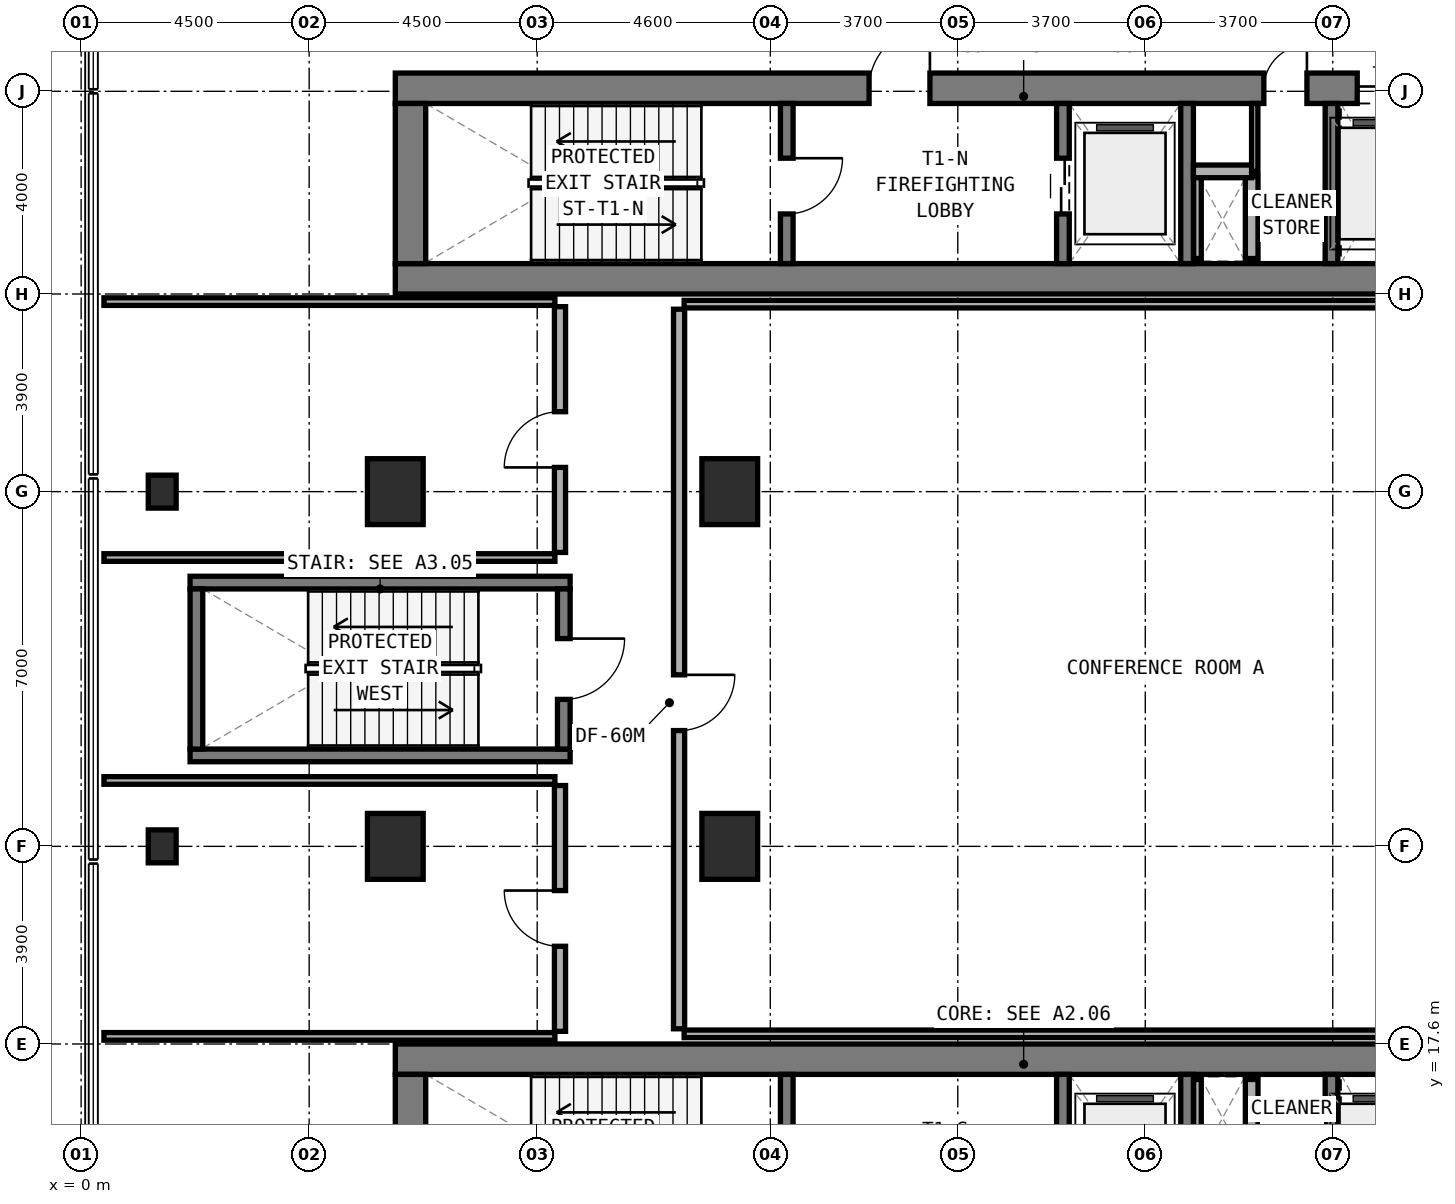
"""IFC4 building model, lengths in metres.
Left out: names, types, materials, properties, quantities, classifications, styles, units other than length and angle.
Written with IfcOpenShell. Run it as: python <this file> out.ifc"""

import sys

from ifc_helpers import new_model, si_unit, direction, frame, frame_2d, origin, origin_2d, place, context, subcontext, project, spatial, rectangle, extrude, element, fill, save


model = new_model("IFC4")
c1 = context("Model", 3, precision=1e-05, world=origin(), true_north=direction((0.0, 1.0)))
c2 = subcontext(c1, "Body", "Model", "MODEL_VIEW")
j1 = project(units=[si_unit("LENGTHUNIT", "METRE"), si_unit("PLANEANGLEUNIT", "RADIAN")], contexts=[c1])
p1 = place(None, origin())
s1 = spatial("IfcSite", under=j1, at=p1, CompositionType="ELEMENT")
p2 = place(p1, origin())
s2 = spatial("IfcBuilding", under=s1, at=p2, CompositionType="ELEMENT")
p3 = place(p2, frame((0.0, 0.0, 15.0)))
s3 = spatial("IfcBuildingStorey", under=s2, at=p3, CompositionType="ELEMENT", Elevation=15.0)
p4 = place(p3, frame((6.2, 32.7, 0.0), z_axis=(0.0, 0.0, 1.0), x_axis=(1.0, 0.0, 0.0)))
e1 = element("IfcWall", 1, at=p4, inside=s3, PredefinedType="SHEAR", context=c2, shape_type="SweptSolid", body=[
    extrude(rectangle(XDim=24.8, YDim=0.6, at=frame_2d((12.4, 0.0))), origin(), (0.0, 0.0, 1.0), 4.5),
])
p5 = place(p3, frame((6.2, 36.46, 0.0), z_axis=(0.0, 0.0, 1.0), x_axis=(1.0, 0.0, 0.0)))
e2 = element("IfcWall", 2, at=p5, inside=s3, PredefinedType="SHEAR", context=c2, shape_type="SweptSolid", body=[
    extrude(rectangle(XDim=24.8, YDim=0.6, at=frame_2d((12.4, 0.0))), origin(), (0.0, 0.0, 1.0), 4.5),
])
p6 = place(p5, frame((9.35, 0.0, 0.0)))
e3 = element("IfcOpeningElement", 3, at=p6, cuts=e2, PredefinedType="OPENING", context=c2, shape_type="SweptSolid", body=[
    extrude(rectangle(XDim=1.2, YDim=2.15, at=frame_2d((0.6, 1.075))), frame((0.0, 0.31, 0.0), z_axis=(0.0, -1.0, 0.0), x_axis=(1.0, 0.0, 0.0)), (0.0, 0.0, 1.0), 0.62),
])
p7 = place(p5, frame((17.14, 0.0, 0.0)))
e4 = element("IfcOpeningElement", 4, at=p7, cuts=e2, PredefinedType="OPENING", context=c2, shape_type="SweptSolid", body=[
    extrude(rectangle(XDim=0.85, YDim=2.1, at=frame_2d((0.425, 1.05))), frame((0.0, 0.31, 0.0), z_axis=(0.0, -1.0, 0.0), x_axis=(1.0, 0.0, 0.0)), (0.0, 0.0, 1.0), 0.62),
])
p8 = place(p5, frame((18.983, 0.0, 0.0)))
e5 = element("IfcOpeningElement", 5, at=p8, cuts=e2, PredefinedType="OPENING", context=c2, shape_type="SweptSolid", body=[
    extrude(rectangle(XDim=1.1, YDim=2.15, at=frame_2d((0.55, 1.075))), frame((0.0, 0.31, 0.0), z_axis=(0.0, -1.0, 0.0), x_axis=(1.0, 0.0, 0.0)), (0.0, 0.0, 1.0), 0.62),
])
p9 = place(p5, frame((20.85, 0.0, 0.0)))
e6 = element("IfcOpeningElement", 6, at=p9, cuts=e2, PredefinedType="OPENING", context=c2, shape_type="SweptSolid", body=[
    extrude(rectangle(XDim=1.1, YDim=2.15, at=frame_2d((0.55, 1.075))), frame((0.0, 0.31, 0.0), z_axis=(0.0, -1.0, 0.0), x_axis=(1.0, 0.0, 0.0)), (0.0, 0.0, 1.0), 0.62),
])
p10 = place(p5, frame((22.716, 0.0, 0.0)))
e7 = element("IfcOpeningElement", 7, at=p10, cuts=e2, PredefinedType="OPENING", context=c2, shape_type="SweptSolid", body=[
    extrude(rectangle(XDim=1.1, YDim=2.15, at=frame_2d((0.55, 1.075))), frame((0.0, 0.31, 0.0), z_axis=(0.0, -1.0, 0.0), x_axis=(1.0, 0.0, 0.0)), (0.0, 0.0, 1.0), 0.62),
])
p11 = place(p3, frame((6.5, 33.0, 0.0), z_axis=(0.0, 0.0, 1.0), x_axis=(0.0, 1.0, 0.0)))
e8 = element("IfcWall", 8, at=p11, inside=s3, PredefinedType="SHEAR", context=c2, shape_type="SweptSolid", body=[
    extrude(rectangle(XDim=3.16, YDim=0.6, at=frame_2d((1.58, 0.0))), origin(), (0.0, 0.0, 1.0), 4.5),
])
p12 = place(p3, frame((13.925, 33.0, 0.0), z_axis=(0.0, 0.0, 1.0), x_axis=(0.0, 1.0, 0.0)))
e9 = element("IfcWall", 9, at=p12, inside=s3, PredefinedType="STANDARD", context=c2, shape_type="SweptSolid", body=[
    extrude(rectangle(XDim=3.16, YDim=0.25, at=frame_2d((1.58, 0.0))), origin(), (0.0, 0.0, 1.0), 4.1),
])
p13 = place(p12, frame((0.98, 0.0, 0.0)))
e10 = element("IfcOpeningElement", 10, at=p13, cuts=e9, PredefinedType="OPENING", context=c2, shape_type="SweptSolid", body=[
    extrude(rectangle(XDim=1.1, YDim=2.15, at=frame_2d((0.55, 1.075))), frame((0.0, 0.135, 0.0), z_axis=(0.0, -1.0, 0.0), x_axis=(1.0, 0.0, 0.0)), (0.0, 0.0, 1.0), 0.27),
])
p14 = place(p3, frame((19.375, 33.0, 0.0), z_axis=(0.0, 0.0, 1.0), x_axis=(0.0, 1.0, 0.0)))
e11 = element("IfcWall", 11, at=p14, inside=s3, PredefinedType="STANDARD", context=c2, shape_type="SweptSolid", body=[
    extrude(rectangle(XDim=3.16, YDim=0.25, at=frame_2d((1.58, 0.0))), origin(), (0.0, 0.0, 1.0), 4.1),
])
p15 = place(p14, frame((0.98, 0.0, 0.0)))
e12 = element("IfcOpeningElement", 12, at=p15, cuts=e11, PredefinedType="OPENING", context=c2, shape_type="SweptSolid", body=[
    extrude(rectangle(XDim=1.1, YDim=2.15, at=frame_2d((0.55, 1.075))), frame((0.0, 0.135, 0.0), z_axis=(0.0, -1.0, 0.0), x_axis=(1.0, 0.0, 0.0)), (0.0, 0.0, 1.0), 0.27),
])
for number, where, z_axis, x_axis in (
    (13, (21.825, 33.0, 0.0), (0.0, 0.0, 1.0), (0.0, 1.0, 0.0)),
    (14, (24.675, 33.0, 0.0), (0.0, 0.0, 1.0), (0.0, 1.0, 0.0)),
):
    element("IfcWall", number, at=place(p3, frame(where, z_axis=z_axis, x_axis=x_axis)), inside=s3, PredefinedType="STANDARD", context=c2, shape_type="SweptSolid", body=[
        extrude(rectangle(XDim=3.16, YDim=0.25, at=frame_2d((1.58, 0.0))), origin(), (0.0, 0.0, 1.0), 4.1),
    ])
p16 = place(p3, frame((6.2, 17.3, 0.0), z_axis=(0.0, 0.0, 1.0), x_axis=(1.0, 0.0, 0.0)))
e15 = element("IfcWall", 15, at=p16, inside=s3, PredefinedType="SHEAR", context=c2, shape_type="SweptSolid", body=[
    extrude(rectangle(XDim=24.8, YDim=0.6, at=frame_2d((12.4, 0.0))), origin(), (0.0, 0.0, 1.0), 4.5),
])
p17 = place(p3, frame((6.5, 13.84, 0.0), z_axis=(0.0, 0.0, 1.0), x_axis=(0.0, 1.0, 0.0)))
e16 = element("IfcWall", 16, at=p17, inside=s3, PredefinedType="SHEAR", context=c2, shape_type="SweptSolid", body=[
    extrude(rectangle(XDim=3.16, YDim=0.6, at=frame_2d((1.58, 0.0))), origin(), (0.0, 0.0, 1.0), 4.5),
])
p18 = place(p3, frame((13.925, 13.84, 0.0), z_axis=(0.0, 0.0, 1.0), x_axis=(0.0, 1.0, 0.0)))
e17 = element("IfcWall", 17, at=p18, inside=s3, PredefinedType="STANDARD", context=c2, shape_type="SweptSolid", body=[
    extrude(rectangle(XDim=3.16, YDim=0.25, at=frame_2d((1.58, 0.0))), origin(), (0.0, 0.0, 1.0), 4.1),
])
p19 = place(p18, frame((0.98, 0.0, 0.0)))
e18 = element("IfcOpeningElement", 18, at=p19, cuts=e17, PredefinedType="OPENING", context=c2, shape_type="SweptSolid", body=[
    extrude(rectangle(XDim=1.1, YDim=2.15, at=frame_2d((0.55, 1.075))), frame((0.0, 0.135, 0.0), z_axis=(0.0, -1.0, 0.0), x_axis=(1.0, 0.0, 0.0)), (0.0, 0.0, 1.0), 0.27),
])
p20 = place(p3, frame((19.375, 13.84, 0.0), z_axis=(0.0, 0.0, 1.0), x_axis=(0.0, 1.0, 0.0)))
e19 = element("IfcWall", 19, at=p20, inside=s3, PredefinedType="STANDARD", context=c2, shape_type="SweptSolid", body=[
    extrude(rectangle(XDim=3.16, YDim=0.25, at=frame_2d((1.58, 0.0))), origin(), (0.0, 0.0, 1.0), 4.1),
])
p21 = place(p20, frame((0.98, 0.0, 0.0)))
e20 = element("IfcOpeningElement", 20, at=p21, cuts=e19, PredefinedType="OPENING", context=c2, shape_type="SweptSolid", body=[
    extrude(rectangle(XDim=1.1, YDim=2.15, at=frame_2d((0.55, 1.075))), frame((0.0, 0.135, 0.0), z_axis=(0.0, -1.0, 0.0), x_axis=(1.0, 0.0, 0.0)), (0.0, 0.0, 1.0), 0.27),
])
for number, where, z_axis, x_axis in (
    (21, (21.825, 13.84, 0.0), (0.0, 0.0, 1.0), (0.0, 1.0, 0.0)),
    (22, (24.675, 13.84, 0.0), (0.0, 0.0, 1.0), (0.0, 1.0, 0.0)),
):
    element("IfcWall", number, at=place(p3, frame(where, z_axis=z_axis, x_axis=x_axis)), inside=s3, PredefinedType="STANDARD", context=c2, shape_type="SweptSolid", body=[
        extrude(rectangle(XDim=3.16, YDim=0.25, at=frame_2d((1.58, 0.0))), origin(), (0.0, 0.0, 1.0), 4.1),
    ])
for number, where, z_axis, x_axis in (
    (23, (2.15, 23.295, 0.0), (0.0, 0.0, 1.0), (1.0, 0.0, 0.0)),
    (24, (2.15, 26.705, 0.0), (0.0, 0.0, 1.0), (1.0, 0.0, 0.0)),
):
    element("IfcWall", number, at=place(p3, frame(where, z_axis=z_axis, x_axis=x_axis)), inside=s3, PredefinedType="STANDARD", context=c2, shape_type="SweptSolid", body=[
        extrude(rectangle(XDim=7.5, YDim=0.25, at=frame_2d((3.75, 0.0))), origin(), (0.0, 0.0, 1.0), 4.5),
    ])
p22 = place(p3, frame((2.275, 23.42, 0.0), z_axis=(0.0, 0.0, 1.0), x_axis=(0.0, 1.0, 0.0)))
e25 = element("IfcWall", 25, at=p22, inside=s3, PredefinedType="STANDARD", context=c2, shape_type="SweptSolid", body=[
    extrude(rectangle(XDim=3.16, YDim=0.25, at=frame_2d((1.58, 0.0))), origin(), (0.0, 0.0, 1.0), 4.5),
])
p23 = place(p3, frame((9.525, 23.42, 0.0), z_axis=(0.0, 0.0, 1.0), x_axis=(0.0, 1.0, 0.0)))
e26 = element("IfcWall", 26, at=p23, inside=s3, PredefinedType="STANDARD", context=c2, shape_type="SweptSolid", body=[
    extrude(rectangle(XDim=3.16, YDim=0.25, at=frame_2d((1.58, 0.0))), origin(), (0.0, 0.0, 1.0), 4.5),
])
p24 = place(p23, frame((0.98, 0.0, 0.0)))
e27 = element("IfcOpeningElement", 27, at=p24, cuts=e26, PredefinedType="OPENING", context=c2, shape_type="SweptSolid", body=[
    extrude(rectangle(XDim=1.2, YDim=2.15, at=frame_2d((0.6, 1.075))), frame((0.0, 0.135, 0.0), z_axis=(0.0, -1.0, 0.0), x_axis=(1.0, 0.0, 0.0)), (0.0, 0.0, 1.0), 0.27),
])
for number, where, z_axis, x_axis in (
    (28, (6.2, 21.5, 0.0), (0.0, 0.0, 1.0), (1.0, 0.0, 0.0)),
    (29, (6.2, 28.5, 0.0), (0.0, 0.0, 1.0), (1.0, 0.0, 0.0)),
    (30, (12.8, 21.5, 0.0), (0.0, 0.0, 1.0), (1.0, 0.0, 0.0)),
    (31, (12.8, 28.5, 0.0), (0.0, 0.0, 1.0), (1.0, 0.0, 0.0)),
):
    element("IfcColumn", number, at=place(p3, frame(where, z_axis=z_axis, x_axis=x_axis)), inside=s3, PredefinedType="COLUMN", context=c2, shape_type="SweptSolid", body=[
        extrude(rectangle(XDim=1.1, YDim=1.3, at=origin_2d()), origin(), (0.0, 0.0, 1.0), 4.5),
    ])
for number, where, z_axis, x_axis in (
    (32, (1.6, 21.5, 0.0), (0.0, 0.0, 1.0), (1.0, 0.0, 0.0)),
    (33, (1.6, 28.5, 0.0), (0.0, 0.0, 1.0), (1.0, 0.0, 0.0)),
):
    element("IfcColumn", number, at=place(p3, frame(where, z_axis=z_axis, x_axis=x_axis)), inside=s3, PredefinedType="PILASTER", context=c2, shape_type="SweptSolid", body=[
        extrude(rectangle(XDim=0.55, YDim=0.65, at=origin_2d()), origin(), (0.0, 0.0, 1.0), 4.5),
    ])
p25 = place(p3, frame((22.03, 33.1, 0.0), z_axis=(0.0, 0.0, 1.0), x_axis=(0.0, 1.0, 0.0)))
e34 = element("IfcWall", 34, at=p25, inside=s3, PredefinedType="PARTITIONING", context=c2, shape_type="SweptSolid", body=[
    extrude(rectangle(XDim=1.62, YDim=0.15, at=frame_2d((0.81, 0.0))), origin(), (0.0, 0.0, 1.0), 4.1),
])
p26 = place(p3, frame((23.1, 33.1, 0.0), z_axis=(0.0, 0.0, 1.0), x_axis=(0.0, 1.0, 0.0)))
e35 = element("IfcWall", 35, at=p26, inside=s3, PredefinedType="SOLIDWALL", context=c2, shape_type="SweptSolid", body=[
    extrude(rectangle(XDim=1.62, YDim=0.25, at=frame_2d((0.81, 0.0))), origin(), (0.0, 0.0, 1.0), 4.1),
])
p27 = place(p3, frame((21.95, 34.82, 0.0), z_axis=(0.0, 0.0, 1.0), x_axis=(1.0, 0.0, 0.0)))
e36 = element("IfcWall", 36, at=p27, inside=s3, PredefinedType="SOLIDWALL", context=c2, shape_type="SweptSolid", body=[
    extrude(rectangle(XDim=1.15, YDim=0.25, at=frame_2d((0.575, 0.0))), origin(), (0.0, 0.0, 1.0), 4.1),
])
p28 = place(p3, frame((23.16, 34.82, 0.0), z_axis=(0.0, 0.0, 1.0), x_axis=(0.0, 1.0, 0.0)))
e37 = element("IfcWall", 37, at=p28, inside=s3, PredefinedType="PARTITIONING", context=c2, shape_type="SweptSolid", body=[
    extrude(rectangle(XDim=1.34, YDim=0.125, at=frame_2d((0.67, 0.0))), origin(), (0.0, 0.0, 1.0), 4.1),
])
p29 = place(p3, frame((22.03, 15.28, 0.0), z_axis=(0.0, 0.0, 1.0), x_axis=(0.0, 1.0, 0.0)))
e38 = element("IfcWall", 38, at=p29, inside=s3, PredefinedType="PARTITIONING", context=c2, shape_type="SweptSolid", body=[
    extrude(rectangle(XDim=1.62, YDim=0.15, at=frame_2d((0.81, 0.0))), origin(), (0.0, 0.0, 1.0), 4.1),
])
p30 = place(p3, frame((23.1, 15.28, 0.0), z_axis=(0.0, 0.0, 1.0), x_axis=(0.0, 1.0, 0.0)))
e39 = element("IfcWall", 39, at=p30, inside=s3, PredefinedType="SOLIDWALL", context=c2, shape_type="SweptSolid", body=[
    extrude(rectangle(XDim=1.62, YDim=0.25, at=frame_2d((0.81, 0.0))), origin(), (0.0, 0.0, 1.0), 4.1),
])
for number, where, z_axis, x_axis in (
    (40, (11.9, 17.8, 0.0), (0.0, 0.0, 1.0), (1.0, 0.0, 0.0)),
    (41, (11.9, 32.2, 0.0), (0.0, 0.0, 1.0), (1.0, 0.0, 0.0)),
):
    element("IfcWall", number, at=place(p3, frame(where, z_axis=z_axis, x_axis=x_axis)), inside=s3, PredefinedType="PARTITIONING", context=c2, shape_type="SweptSolid", body=[
        extrude(rectangle(XDim=19.0, YDim=0.15, at=frame_2d((9.5, 0.0))), origin(), (0.0, 0.0, 1.0), 3.175),
    ])
p31 = place(p3, frame((11.8, 17.9, 0.0), z_axis=(0.0, 0.0, 1.0), x_axis=(0.0, 1.0, 0.0)))
e42 = element("IfcWall", 42, at=p31, inside=s3, PredefinedType="SOLIDWALL", context=c2, shape_type="SweptSolid", body=[
    extrude(rectangle(XDim=14.2, YDim=0.22, at=frame_2d((7.1, 0.0))), origin(), (0.0, 0.0, 1.0), 3.175),
])
p32 = place(p31, frame((5.885, 0.0, 0.0)))
e43 = element("IfcOpeningElement", 43, at=p32, cuts=e42, PredefinedType="OPENING", context=c2, shape_type="SweptSolid", body=[
    extrude(rectangle(XDim=1.1, YDim=2.1, at=frame_2d((0.55, 1.05))), frame((0.0, 0.12, 0.0), z_axis=(0.0, -1.0, 0.0), x_axis=(1.0, 0.0, 0.0)), (0.0, 0.0, 1.0), 0.24),
])
p33 = place(p3, frame((0.45, 17.75, 0.0), z_axis=(0.0, 0.0, 1.0), x_axis=(1.0, 0.0, 0.0)))
e44 = element("IfcWall", 44, at=p33, inside=s3, PredefinedType="PARTITIONING", context=c2, shape_type="SweptSolid", body=[
    extrude(rectangle(XDim=8.9, YDim=0.15, at=frame_2d((4.45, 0.0))), origin(), (0.0, 0.0, 1.0), 3.375),
])
p34 = place(p3, frame((0.45, 22.8, 0.0), z_axis=(0.0, 0.0, 1.0), x_axis=(1.0, 0.0, 0.0)))
e45 = element("IfcWall", 45, at=p34, inside=s3, PredefinedType="PARTITIONING", context=c2, shape_type="SweptSolid", body=[
    extrude(rectangle(XDim=8.9, YDim=0.15, at=frame_2d((4.45, 0.0))), origin(), (0.0, 0.0, 1.0), 3.575),
])
p35 = place(p3, frame((9.45, 17.85, 0.0), z_axis=(0.0, 0.0, 1.0), x_axis=(0.0, 1.0, 0.0)))
e46 = element("IfcWall", 46, at=p35, inside=s3, PredefinedType="SOLIDWALL", context=c2, shape_type="SweptSolid", body=[
    extrude(rectangle(XDim=4.85, YDim=0.22, at=frame_2d((2.425, 0.0))), origin(), (0.0, 0.0, 1.0), 3.175),
])
p36 = place(p35, frame((1.678, 0.0, 0.0)))
e47 = element("IfcOpeningElement", 47, at=p36, cuts=e46, PredefinedType="OPENING", context=c2, shape_type="SweptSolid", body=[
    extrude(rectangle(XDim=1.1, YDim=2.1, at=frame_2d((0.55, 1.05))), frame((0.0, 0.12, 0.0), z_axis=(0.0, -1.0, 0.0), x_axis=(1.0, 0.0, 0.0)), (0.0, 0.0, 1.0), 0.24),
])
p37 = place(p3, frame((0.45, 27.2, 0.0), z_axis=(0.0, 0.0, 1.0), x_axis=(1.0, 0.0, 0.0)))
e48 = element("IfcWall", 48, at=p37, inside=s3, PredefinedType="PARTITIONING", context=c2, shape_type="SweptSolid", body=[
    extrude(rectangle(XDim=8.9, YDim=0.15, at=frame_2d((4.45, 0.0))), origin(), (0.0, 0.0, 1.0), 3.575),
])
p38 = place(p3, frame((0.45, 32.25, 0.0), z_axis=(0.0, 0.0, 1.0), x_axis=(1.0, 0.0, 0.0)))
e49 = element("IfcWall", 49, at=p38, inside=s3, PredefinedType="PARTITIONING", context=c2, shape_type="SweptSolid", body=[
    extrude(rectangle(XDim=8.9, YDim=0.15, at=frame_2d((4.45, 0.0))), origin(), (0.0, 0.0, 1.0), 3.375),
])
p39 = place(p3, frame((9.45, 27.3, 0.0), z_axis=(0.0, 0.0, 1.0), x_axis=(0.0, 1.0, 0.0)))
e50 = element("IfcWall", 50, at=p39, inside=s3, PredefinedType="SOLIDWALL", context=c2, shape_type="SweptSolid", body=[
    extrude(rectangle(XDim=4.85, YDim=0.22, at=frame_2d((2.425, 0.0))), origin(), (0.0, 0.0, 1.0), 3.175),
])
p40 = place(p39, frame((1.678, 0.0, 0.0)))
e51 = element("IfcOpeningElement", 51, at=p40, cuts=e50, PredefinedType="OPENING", context=c2, shape_type="SweptSolid", body=[
    extrude(rectangle(XDim=1.1, YDim=2.1, at=frame_2d((0.55, 1.05))), frame((0.0, 0.12, 0.0), z_axis=(0.0, -1.0, 0.0), x_axis=(1.0, 0.0, 0.0)), (0.0, 0.0, 1.0), 0.24),
])
p41 = place(p13, frame((1.1, 0.0, 0.0), z_axis=(0.0, 0.0, 1.0), x_axis=(-1.0, 0.0, 0.0)))
e52 = element("IfcDoor", 52, at=p41, inside=s3, OperationType="SINGLE_SWING_LEFT", PredefinedType="DOOR", context=c2, shape_type="SweptSolid", body=[
    extrude(rectangle(XDim=1.1, YDim=2.15, at=frame_2d((0.55, 1.075))), frame((0.0, 0.025, 0.0), z_axis=(0.0, -1.0, 0.0), x_axis=(1.0, 0.0, 0.0)), (0.0, 0.0, 1.0), 0.05),
])
fill(e10, e52)
p42 = place(p6, origin())
e53 = element("IfcDoor", 53, at=p42, inside=s3, OperationType="SINGLE_SWING_RIGHT", PredefinedType="DOOR", context=c2, shape_type="SweptSolid", body=[
    extrude(rectangle(XDim=1.2, YDim=2.15, at=frame_2d((0.6, 1.075))), frame((0.0, 0.025, 0.0), z_axis=(0.0, -1.0, 0.0), x_axis=(1.0, 0.0, 0.0)), (0.0, 0.0, 1.0), 0.05),
])
fill(e3, e53)
p43 = place(p15, origin())
e54 = element("IfcDoor", 54, at=p43, inside=s3, OperationType="DOUBLE_DOOR_SLIDING", PredefinedType="DOOR", context=c2, shape_type="SweptSolid", body=[
    extrude(rectangle(XDim=1.1, YDim=2.15, at=frame_2d((0.55, 1.075))), frame((0.0, 0.025, 0.0), z_axis=(0.0, -1.0, 0.0), x_axis=(1.0, 0.0, 0.0)), (0.0, 0.0, 1.0), 0.05),
])
fill(e12, e54)
p44 = place(p7, origin())
e55 = element("IfcDoor", 55, at=p44, inside=s3, OperationType="SINGLE_SWING_RIGHT", PredefinedType="DOOR", context=c2, shape_type="SweptSolid", body=[
    extrude(rectangle(XDim=0.85, YDim=2.1, at=frame_2d((0.425, 1.05))), frame((0.0, 0.025, 0.0), z_axis=(0.0, -1.0, 0.0), x_axis=(1.0, 0.0, 0.0)), (0.0, 0.0, 1.0), 0.05),
])
fill(e4, e55)
p45 = place(p8, origin())
e56 = element("IfcDoor", 56, at=p45, inside=s3, OperationType="DOUBLE_DOOR_SLIDING", PredefinedType="DOOR", context=c2, shape_type="SweptSolid", body=[
    extrude(rectangle(XDim=1.1, YDim=2.15, at=frame_2d((0.55, 1.075))), frame((0.0, 0.025, 0.0), z_axis=(0.0, -1.0, 0.0), x_axis=(1.0, 0.0, 0.0)), (0.0, 0.0, 1.0), 0.05),
])
fill(e5, e56)
p46 = place(p24, frame((1.2, 0.0, 0.0), z_axis=(0.0, 0.0, 1.0), x_axis=(-1.0, 0.0, 0.0)))
e57 = element("IfcDoor", 57, at=p46, inside=s3, OperationType="SINGLE_SWING_LEFT", PredefinedType="DOOR", context=c2, shape_type="SweptSolid", body=[
    extrude(rectangle(XDim=1.2, YDim=2.15, at=frame_2d((0.6, 1.075))), frame((0.0, 0.025, 0.0), z_axis=(0.0, -1.0, 0.0), x_axis=(1.0, 0.0, 0.0)), (0.0, 0.0, 1.0), 0.05),
])
fill(e27, e57)
p47 = place(p32, frame((1.1, 0.0, 0.0), z_axis=(0.0, 0.0, 1.0), x_axis=(-1.0, 0.0, 0.0)))
e58 = element("IfcDoor", 58, at=p47, inside=s3, OperationType="SINGLE_SWING_LEFT", PredefinedType="DOOR", context=c2, shape_type="SweptSolid", body=[
    extrude(rectangle(XDim=1.1, YDim=2.1, at=frame_2d((0.55, 1.05))), frame((0.0, 0.025, 0.0), z_axis=(0.0, -1.0, 0.0), x_axis=(1.0, 0.0, 0.0)), (0.0, 0.0, 1.0), 0.05),
])
fill(e43, e58)
p48 = place(p36, origin())
e59 = element("IfcDoor", 59, at=p48, inside=s3, OperationType="SINGLE_SWING_RIGHT", PredefinedType="DOOR", context=c2, shape_type="SweptSolid", body=[
    extrude(rectangle(XDim=1.1, YDim=2.1, at=frame_2d((0.55, 1.05))), frame((0.0, 0.025, 0.0), z_axis=(0.0, -1.0, 0.0), x_axis=(1.0, 0.0, 0.0)), (0.0, 0.0, 1.0), 0.05),
])
fill(e47, e59)
p49 = place(p40, origin())
e60 = element("IfcDoor", 60, at=p49, inside=s3, OperationType="SINGLE_SWING_LEFT", PredefinedType="DOOR", context=c2, shape_type="SweptSolid", body=[
    extrude(rectangle(XDim=1.1, YDim=2.1, at=frame_2d((0.55, 1.05))), frame((0.0, 0.025, 0.0), z_axis=(0.0, -1.0, 0.0), x_axis=(1.0, 0.0, 0.0)), (0.0, 0.0, 1.0), 0.05),
])
fill(e51, e60)
save(model, sys.argv[1])
